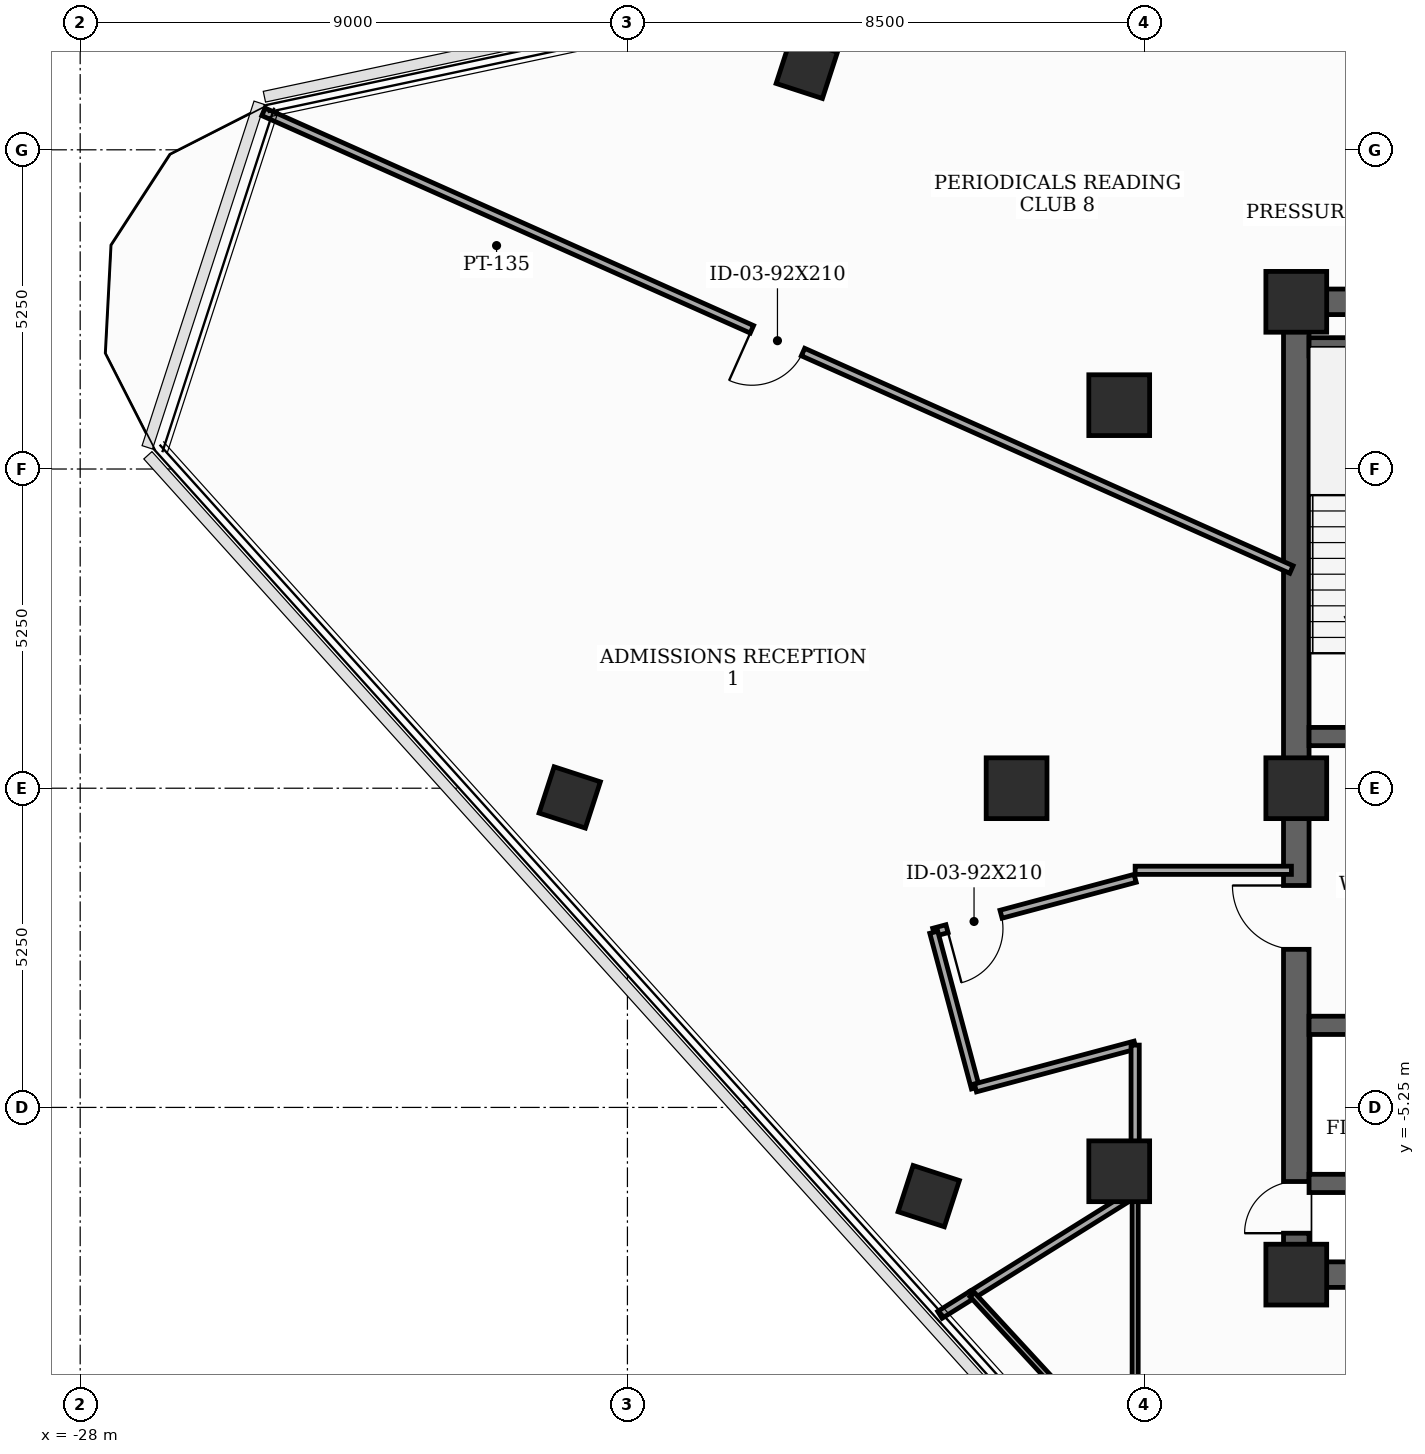
"""IFC4 building model, lengths in metres.
Left out: names, types, materials, properties, quantities, classifications, styles, units other than length and angle.
Written with IfcOpenShell. Run it as: python <this file> out.ifc"""

import sys

from ifc_helpers import new_model, si_unit, direction, frame, frame_2d, origin, origin_2d, place, context, subcontext, project, spatial, rectangle, extrude, element, fill, save


model = new_model("IFC4")
c1 = context("Model", 3, precision=1e-05, world=origin(), true_north=direction((0.0, 1.0)))
c2 = subcontext(c1, "Body", "Model", "MODEL_VIEW")
j1 = project(units=[si_unit("LENGTHUNIT", "METRE"), si_unit("PLANEANGLEUNIT", "RADIAN")], contexts=[c1])
p1 = place(None, origin())
s1 = spatial("IfcSite", under=j1, at=p1, CompositionType="ELEMENT")
p2 = place(p1, origin())
s2 = spatial("IfcBuilding", under=s1, at=p2, CompositionType="ELEMENT")
p3 = place(p2, frame((0.0, 0.0, 283.2)))
s3 = spatial("IfcBuildingStorey", under=s2, at=p3, CompositionType="ELEMENT", Elevation=283.2)
for number, where, z_axis, x_axis in (
    (1, (-8.0, -8.0, 0.0), (0.0, 0.0, 1.0), (1.0, 0.0, 0.0)),
    (2, (-8.0, 8.0, 0.0), (0.0, 0.0, 1.0), (1.0, 0.0, 0.0)),
    (3, (-8.0, 0.0, 0.0), (0.0, 0.0, 1.0), (1.0, 0.0, 0.0)),
    (4, (-10.912, 6.3, 0.0), (0.0, 0.0, 1.0), (1.0, 0.0, 0.0)),
    (5, (-12.6, 0.0, 0.0), (0.0, 0.0, 1.0), (1.0, 0.0, 0.0)),
    (6, (-10.912, -6.3, 0.0), (0.0, 0.0, 1.0), (1.0, 0.0, 0.0)),
):
    element("IfcColumn", number, at=place(p3, frame(where, z_axis=z_axis, x_axis=x_axis)), inside=s3, PredefinedType="COLUMN", context=c2, shape_type="SweptSolid", body=[
        extrude(rectangle(XDim=1.0, YDim=1.0, at=origin_2d()), origin(), (0.0, 0.0, 1.0), 3.7),
    ])
for number, where, z_axis, x_axis in (
    (7, (-16.05, 11.848, 0.0), (0.0, 0.0, 1.0), (0.309, 0.951, 0.0)),
    (8, (-19.949, -0.151, 0.0), (0.0, 0.0, 1.0), (0.309, 0.951, 0.0)),
    (9, (-14.045, -6.709, 0.0), (0.0, 0.0, 1.0), (0.309, 0.951, 0.0)),
):
    element("IfcColumn", number, at=place(p3, frame(where, z_axis=z_axis, x_axis=x_axis)), inside=s3, PredefinedType="COLUMN", context=c2, shape_type="SweptSolid", body=[
        extrude(rectangle(XDim=0.8, YDim=0.8, at=origin_2d()), origin(), (0.0, 0.0, 1.0), 3.7),
    ])
p4 = place(p3, frame((-8.0, -8.0, 0.0), z_axis=(0.0, 0.0, 1.0), x_axis=(0.0, 1.0, 0.0)))
e10 = element("IfcWall", 10, at=p4, inside=s3, PredefinedType="SHEAR", context=c2, shape_type="SweptSolid", body=[
    extrude(rectangle(XDim=16.0, YDim=0.42, at=frame_2d((8.0, 0.0))), origin(), (0.0, 0.0, 1.0), 3.5),
])
p5 = place(p4, frame((0.681, 0.0, 0.0)))
e11 = element("IfcOpeningElement", 11, at=p5, cuts=e10, PredefinedType="OPENING", context=c2, shape_type="SweptSolid", body=[
    extrude(rectangle(XDim=0.85, YDim=2.02, at=frame_2d((0.425, 1.01))), frame((0.0, 0.22, 0.0), z_axis=(0.0, -1.0, 0.0), x_axis=(1.0, 0.0, 0.0)), (0.0, 0.0, 1.0), 0.44),
])
p6 = place(p4, frame((5.35, 0.0, 0.0)))
e12 = element("IfcOpeningElement", 12, at=p6, cuts=e10, PredefinedType="OPENING", context=c2, shape_type="SweptSolid", body=[
    extrude(rectangle(XDim=1.05, YDim=2.15, at=frame_2d((0.525, 1.075))), frame((0.0, 0.22, 0.0), z_axis=(0.0, -1.0, 0.0), x_axis=(1.0, 0.0, 0.0)), (0.0, 0.0, 1.0), 0.44),
])
p7 = place(p3, frame((-8.0, -8.0, 0.0), z_axis=(0.0, 0.0, 1.0), x_axis=(1.0, 0.0, 0.0)))
e13 = element("IfcWall", 13, at=p7, inside=s3, PredefinedType="SHEAR", context=c2, shape_type="SweptSolid", body=[
    extrude(rectangle(XDim=16.0, YDim=0.42, at=frame_2d((8.0, 0.0))), origin(), (0.0, 0.0, 1.0), 3.5),
])
p8 = place(p7, frame((7.52, 0.0, 0.0)))
e14 = element("IfcOpeningElement", 14, at=p8, cuts=e13, PredefinedType="OPENING", context=c2, shape_type="SweptSolid", body=[
    extrude(rectangle(XDim=0.95, YDim=2.1, at=frame_2d((0.475, 1.05))), frame((0.0, 0.22, 0.0), z_axis=(0.0, -1.0, 0.0), x_axis=(1.0, 0.0, 0.0)), (0.0, 0.0, 1.0), 0.44),
])
p9 = place(p3, frame((-8.0, 8.0, 0.0), z_axis=(0.0, 0.0, 1.0), x_axis=(1.0, 0.0, 0.0)))
e15 = element("IfcWall", 15, at=p9, inside=s3, PredefinedType="SHEAR", context=c2, shape_type="SweptSolid", body=[
    extrude(rectangle(XDim=16.0, YDim=0.42, at=frame_2d((8.0, 0.0))), origin(), (0.0, 0.0, 1.0), 3.5),
])
p10 = place(p9, frame((7.1, 0.0, 0.0)))
e16 = element("IfcOpeningElement", 16, at=p10, cuts=e15, PredefinedType="OPENING", context=c2, shape_type="SweptSolid", body=[
    extrude(rectangle(XDim=1.8, YDim=2.15, at=frame_2d((0.9, 1.075))), frame((0.0, 0.22, 0.0), z_axis=(0.0, -1.0, 0.0), x_axis=(1.0, 0.0, 0.0)), (0.0, 0.0, 1.0), 0.44),
])
p11 = place(p3, frame((-7.79, 0.85, 0.0), z_axis=(0.0, 0.0, 1.0), x_axis=(1.0, 0.0, 0.0)))
e17 = element("IfcWall", 17, at=p11, inside=s3, PredefinedType="SHEAR", context=c2, shape_type="SweptSolid", body=[
    extrude(rectangle(XDim=3.34, YDim=0.3, at=frame_2d((1.67, 0.0))), origin(), (0.0, 0.0, 1.0), 3.5),
])
p12 = place(p11, frame((1.85, 0.0, 0.0)))
e18 = element("IfcOpeningElement", 18, at=p12, cuts=e17, PredefinedType="OPENING", context=c2, shape_type="SweptSolid", body=[
    extrude(rectangle(XDim=1.05, YDim=2.15, at=frame_2d((0.525, 1.075))), frame((0.0, 0.16, 0.0), z_axis=(0.0, -1.0, 0.0), x_axis=(1.0, 0.0, 0.0)), (0.0, 0.0, 1.0), 0.32),
])
p13 = place(p3, frame((-7.79, 7.26, 0.0), z_axis=(0.0, 0.0, 1.0), x_axis=(1.0, 0.0, 0.0)))
e19 = element("IfcWall", 19, at=p13, inside=s3, PredefinedType="SHEAR", context=c2, shape_type="SweptSolid", body=[
    extrude(rectangle(XDim=3.34, YDim=0.3, at=frame_2d((1.67, 0.0))), origin(), (0.0, 0.0, 1.0), 3.5),
])
p14 = place(p3, frame((-7.79, -3.9, 0.0), z_axis=(0.0, 0.0, 1.0), x_axis=(1.0, 0.0, 0.0)))
e20 = element("IfcWall", 20, at=p14, inside=s3, PredefinedType="SHEAR", context=c2, shape_type="SweptSolid", body=[
    extrude(rectangle(XDim=3.34, YDim=0.3, at=frame_2d((1.67, 0.0))), origin(), (0.0, 0.0, 1.0), 3.5),
])
p15 = place(p14, frame((1.27, 0.0, 0.0)))
e21 = element("IfcOpeningElement", 21, at=p15, cuts=e20, PredefinedType="OPENING", context=c2, shape_type="SweptSolid", body=[
    extrude(rectangle(XDim=1.1, YDim=2.1, at=frame_2d((0.55, 1.05))), frame((0.0, 0.16, 0.0), z_axis=(0.0, -1.0, 0.0), x_axis=(1.0, 0.0, 0.0)), (0.0, 0.0, 1.0), 0.32),
])
p16 = place(p3, frame((-7.79, -6.5, 0.0), z_axis=(0.0, 0.0, 1.0), x_axis=(1.0, 0.0, 0.0)))
e22 = element("IfcWall", 22, at=p16, inside=s3, PredefinedType="SHEAR", context=c2, shape_type="SweptSolid", body=[
    extrude(rectangle(XDim=3.34, YDim=0.3, at=frame_2d((1.67, 0.0))), origin(), (0.0, 0.0, 1.0), 3.5),
])
p17 = place(p3, frame((-8.08, -1.35, 0.0), z_axis=(0.0, 0.0, 1.0), x_axis=(-1.0, 0.0, 0.0)))
e23 = element("IfcWall", 23, at=p17, inside=s3, PredefinedType="PARTITIONING", context=c2, shape_type="SweptSolid", body=[
    extrude(rectangle(XDim=2.57, YDim=0.135, at=frame_2d((1.285, 0.0))), origin(), (0.0, 0.0, 1.0), 2.885),
])
p18 = place(p3, frame((-10.65, -1.482, 0.0), z_axis=(0.0, 0.0, 1.0), x_axis=(-0.965961397105, -0.2586862565, 0.0)))
e24 = element("IfcWall", 24, at=p18, inside=s3, PredefinedType="PARTITIONING", context=c2, shape_type="SweptSolid", body=[
    extrude(rectangle(XDim=3.429, YDim=0.135, at=frame_2d((1.714, 0.0))), origin(), (0.0, 0.0, 1.0), 2.885),
])
p19 = place(p18, frame((2.283, 0.0, 0.0)))
e25 = element("IfcOpeningElement", 25, at=p19, cuts=e24, PredefinedType="OPENING", context=c2, shape_type="SweptSolid", body=[
    extrude(rectangle(XDim=0.92, YDim=2.1, at=frame_2d((0.46, 1.05))), frame((0.0, 0.077, 0.0), z_axis=(0.0, -1.0, 0.0), x_axis=(1.0, 0.0, 0.0)), (0.0, 0.0, 1.0), 0.155),
])
p20 = place(p3, frame((-13.962, -2.369, 0.0), z_axis=(0.0, 0.0, 1.0), x_axis=(0.258413725385, -0.966034340245, 0.0)))
e26 = element("IfcWall", 26, at=p20, inside=s3, PredefinedType="PARTITIONING", context=c2, shape_type="SweptSolid", body=[
    extrude(rectangle(XDim=2.65, YDim=0.135, at=frame_2d((1.325, 0.0))), origin(), (0.0, 0.0, 1.0), 3.5),
])
p21 = place(p3, frame((-13.277, -4.929, 0.0), z_axis=(0.0, 0.0, 1.0), x_axis=(0.965934830229, 0.258785439601, 0.0)))
e27 = element("IfcWall", 27, at=p21, inside=s3, PredefinedType="PARTITIONING", context=c2, shape_type="SweptSolid", body=[
    extrude(rectangle(XDim=2.72, YDim=0.135, at=frame_2d((1.36, 0.0))), origin(), (0.0, 0.0, 1.0), 2.885),
])
p22 = place(p3, frame((-10.65, -4.225, 0.0), z_axis=(0.0, 0.0, 1.0), x_axis=(0.0, -1.0, 0.0)))
e28 = element("IfcWall", 28, at=p22, inside=s3, PredefinedType="PARTITIONING", context=c2, shape_type="SweptSolid", body=[
    extrude(rectangle(XDim=2.43, YDim=0.135, at=frame_2d((1.215, 0.0))), origin(), (0.0, 0.0, 1.0), 2.885),
])
p23 = place(p3, frame((-10.65, -6.655, 0.0), z_axis=(0.0, 0.0, 1.0), x_axis=(0.0, -1.0, 0.0)))
e29 = element("IfcWall", 29, at=p23, inside=s3, PredefinedType="MOVABLE", context=c2, shape_type="SweptSolid", body=[
    extrude(rectangle(XDim=3.495, YDim=0.1, at=frame_2d((1.748, 0.0))), origin(), (0.0, 0.0, 1.0), 2.885),
])
p24 = place(p3, frame((-13.329, -8.329, 0.0), z_axis=(0.0, 0.0, 1.0), x_axis=(0.848059079617, 0.529901686617, 0.0)))
e30 = element("IfcWall", 30, at=p24, inside=s3, PredefinedType="PARTITIONING", context=c2, shape_type="SweptSolid", body=[
    extrude(rectangle(XDim=3.159, YDim=0.135, at=frame_2d((1.58, 0.0))), origin(), (0.0, 0.0, 1.0), 2.885),
])
p25 = place(p3, frame((-13.861, -8.661, 0.0), z_axis=(0.0, 0.0, 1.0), x_axis=(0.848151340075, 0.529754003599, 0.0)))
e31 = element("IfcWall", 31, at=p25, inside=s3, PredefinedType="PARTITIONING", context=c2, shape_type="SweptSolid", body=[
    extrude(rectangle(XDim=0.627, YDim=0.135, at=frame_2d((0.313, 0.0))), origin(), (0.0, 0.0, 1.0), 3.5),
])
p26 = place(p3, frame((-8.08, 3.597, 0.0), z_axis=(0.0, 0.0, 1.0), x_axis=(-0.913542590258, 0.406743083266, 0.0)))
e32 = element("IfcWall", 32, at=p26, inside=s3, PredefinedType="PARTITIONING", context=c2, shape_type="SweptSolid", body=[
    extrude(rectangle(XDim=18.505, YDim=0.135, at=frame_2d((9.252, 0.0))), origin(), (0.0, 0.0, 1.0), 2.885),
])
p27 = place(p26, frame((8.792, 0.0, 0.0)))
e33 = element("IfcOpeningElement", 33, at=p27, cuts=e32, PredefinedType="OPENING", context=c2, shape_type="SweptSolid", body=[
    extrude(rectangle(XDim=0.92, YDim=2.1, at=frame_2d((0.46, 1.05))), frame((0.0, 0.077, 0.0), z_axis=(0.0, -1.0, 0.0), x_axis=(1.0, 0.0, 0.0)), (0.0, 0.0, 1.0), 0.155),
])
p28 = place(p3, frame((-13.329, -8.329, 0.0), z_axis=(0.0, 0.0, 1.0), x_axis=(0.677841155448, -0.735208384052, 0.0)))
e34 = element("IfcWall", 34, at=p28, inside=s3, PredefinedType="MOVABLE", context=c2, shape_type="SweptSolid", body=[
    extrude(rectangle(XDim=6.239, YDim=0.1, at=frame_2d((3.12, 0.0))), origin(), (0.0, 0.0, 1.0), 3.5),
])
p29 = place(p5, origin())
e35 = element("IfcDoor", 35, at=p29, inside=s3, OperationType="SINGLE_SWING_LEFT", PredefinedType="TRAPDOOR", context=c2, shape_type="SweptSolid", body=[
    extrude(rectangle(XDim=0.85, YDim=2.02, at=frame_2d((0.425, 1.01))), frame((0.0, 0.025, 0.0), z_axis=(0.0, -1.0, 0.0), x_axis=(1.0, 0.0, 0.0)), (0.0, 0.0, 1.0), 0.05),
])
fill(e11, e35)
p30 = place(p6, origin())
e36 = element("IfcDoor", 36, at=p30, inside=s3, OperationType="SINGLE_SWING_RIGHT", PredefinedType="DOOR", context=c2, shape_type="SweptSolid", body=[
    extrude(rectangle(XDim=1.05, YDim=2.15, at=frame_2d((0.525, 1.075))), frame((0.0, 0.025, 0.0), z_axis=(0.0, -1.0, 0.0), x_axis=(1.0, 0.0, 0.0)), (0.0, 0.0, 1.0), 0.05),
])
fill(e12, e36)
p31 = place(p19, origin())
e37 = element("IfcDoor", 37, at=p31, inside=s3, OperationType="SINGLE_SWING_RIGHT", PredefinedType="DOOR", context=c2, shape_type="SweptSolid", body=[
    extrude(rectangle(XDim=0.92, YDim=2.1, at=frame_2d((0.46, 1.05))), frame((0.0, 0.025, 0.0), z_axis=(0.0, -1.0, 0.0), x_axis=(1.0, 0.0, 0.0)), (0.0, 0.0, 1.0), 0.05),
])
fill(e25, e37)
p32 = place(p27, origin())
e38 = element("IfcDoor", 38, at=p32, inside=s3, OperationType="SINGLE_SWING_RIGHT", PredefinedType="DOOR", context=c2, shape_type="SweptSolid", body=[
    extrude(rectangle(XDim=0.92, YDim=2.1, at=frame_2d((0.46, 1.05))), frame((0.0, 0.025, 0.0), z_axis=(0.0, -1.0, 0.0), x_axis=(1.0, 0.0, 0.0)), (0.0, 0.0, 1.0), 0.05),
])
fill(e33, e38)
save(model, sys.argv[1])
